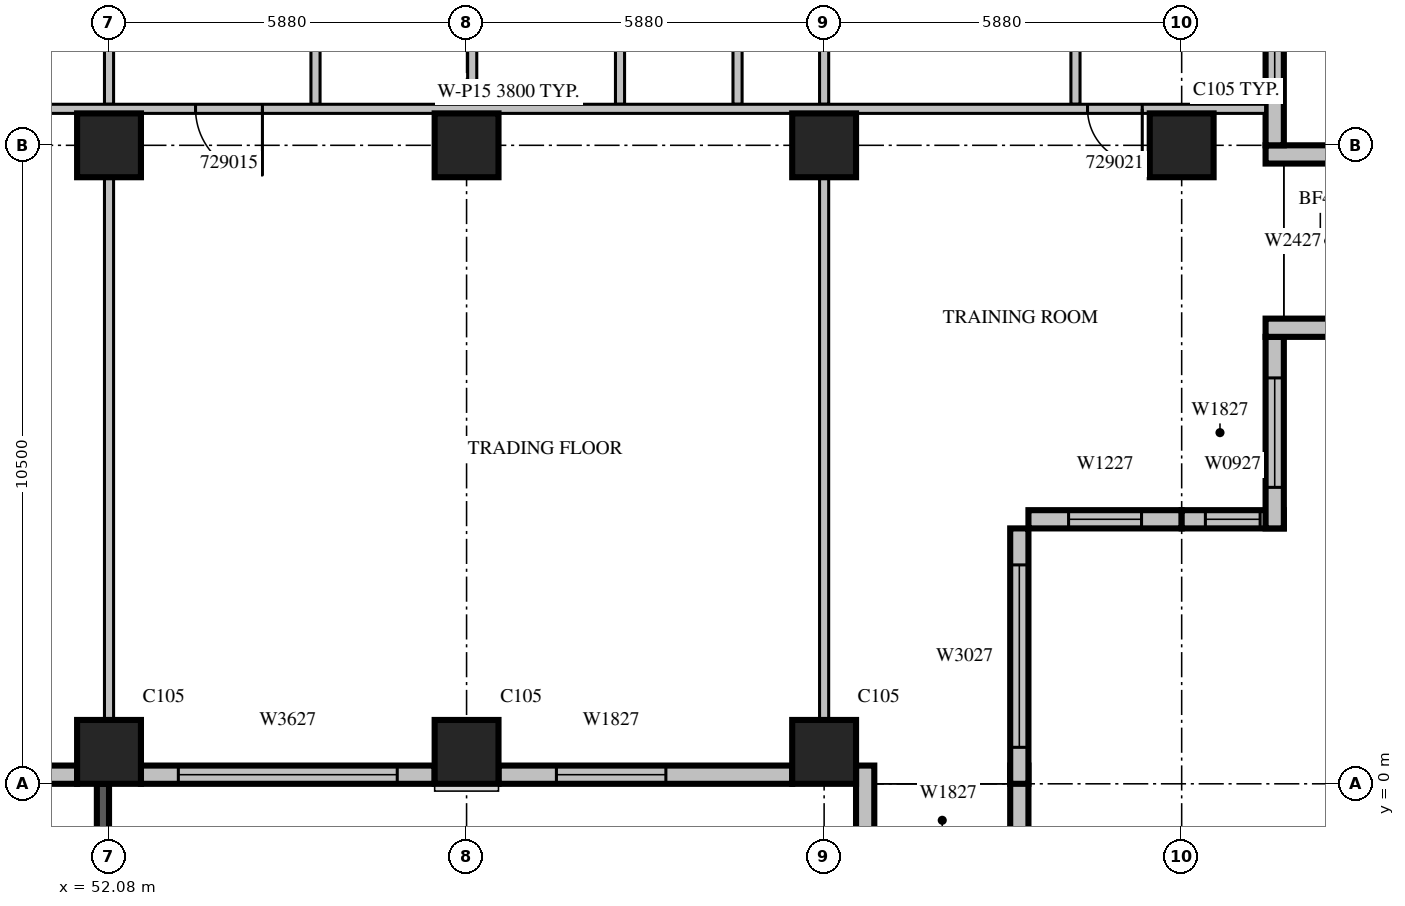
"""IFC4 building model, lengths in metres.
Left out: names, types, materials, properties, quantities, classifications, styles, units other than length and angle.
Written with IfcOpenShell. Run it as: python <this file> out.ifc"""

import sys

from ifc_helpers import new_model, si_unit, direction, frame, frame_2d, origin, origin_2d, place, context, subcontext, project, spatial, rectangle, extrude, source, transform, mapped, element, fill, save


model = new_model("IFC4")
c1 = context("Model", 3, precision=1e-05, world=origin(), true_north=direction((0.0, 1.0)))
c2 = subcontext(c1, "Body", "Model", "MODEL_VIEW")
j1 = project(units=[si_unit("LENGTHUNIT", "METRE"), si_unit("PLANEANGLEUNIT", "RADIAN")], contexts=[c1])
p1 = place(None, origin())
s1 = spatial("IfcSite", under=j1, at=p1, CompositionType="ELEMENT")
p2 = place(p1, origin())
s2 = spatial("IfcBuilding", under=s1, at=p2, CompositionType="ELEMENT")
p3 = place(p2, frame((0.0, 0.0, 132.9)))
s3 = spatial("IfcBuildingStorey", under=s2, at=p3, CompositionType="ELEMENT", Elevation=132.9)
m1 = source(origin(), c2, "Body", "SweptSolid", [
    extrude(rectangle(XDim=1.05, YDim=1.05, at=origin_2d()), origin(), (0.0, 0.0, 1.0), 4.2),
])
for number, where, z_axis, x_axis in (
    (1, (52.08, 0.525, 0.0), (0.0, 0.0, 1.0), (1.0, 0.0, 0.0)),
    (2, (57.96, 0.525, 0.0), (0.0, 0.0, 1.0), (1.0, 0.0, 0.0)),
    (3, (63.84, 0.525, 0.0), (0.0, 0.0, 1.0), (1.0, 0.0, 0.0)),
    (4, (52.08, 10.5, 0.0), (0.0, 0.0, 1.0), (1.0, 0.0, 0.0)),
    (5, (57.96, 10.5, 0.0), (0.0, 0.0, 1.0), (1.0, 0.0, 0.0)),
    (6, (63.84, 10.5, 0.0), (0.0, 0.0, 1.0), (1.0, 0.0, 0.0)),
    (7, (69.72, 10.5, 0.0), (0.0, 0.0, 1.0), (1.0, 0.0, 0.0)),
):
    element("IfcColumn", number, at=place(p3, frame(where, z_axis=z_axis, x_axis=x_axis)), inside=s3, PredefinedType="COLUMN", context=c2, shape_type="MappedRepresentation", body=[
        mapped(m1, transform((0.0, 0.0, 0.0), scale=1.0)),
    ])
m2 = source(origin(), c2, "Body", "SweptSolid", [
    extrude(rectangle(XDim=4.83, YDim=0.3, at=frame_2d((2.415, 0.0))), origin(), (0.0, 0.0, 1.0), 3.8),
])
p4 = place(p3, frame((46.725, 0.15, 0.0), z_axis=(0.0, 0.0, 1.0), x_axis=(1.0, 0.0, 0.0)))
e8 = element("IfcWall", 8, at=p4, inside=s3, PredefinedType="STANDARD", context=c2, shape_type="MappedRepresentation", body=[
    mapped(m2, transform((0.0, 0.0, 0.0), scale=1.0)),
])
m3 = source(origin(), c2, "Body", "SweptSolid", [
    extrude(rectangle(XDim=1.0, YDim=2.1, at=frame_2d((0.5, 1.05))), frame((0.0, 0.16, 0.0), z_axis=(0.0, -1.0, 0.0), x_axis=(1.0, 0.0, 0.0)), (0.0, 0.0, 1.0), 0.32),
])
p5 = place(p4, frame((1.915, 0.0, 0.0)))
e9 = element("IfcOpeningElement", 9, at=p5, cuts=e8, PredefinedType="OPENING", context=c2, shape_type="MappedRepresentation", body=[
    mapped(m3, transform((0.0, 0.0, 0.0), scale=1.0)),
])
p6 = place(p3, frame((52.605, 0.15, 0.0), z_axis=(0.0, 0.0, 1.0), x_axis=(1.0, 0.0, 0.0)))
e10 = element("IfcWall", 10, at=p6, inside=s3, PredefinedType="STANDARD", context=c2, shape_type="MappedRepresentation", body=[
    mapped(m2, transform((0.0, 0.0, 0.0), scale=1.0)),
])
m4 = source(origin(), c2, "Body", "SweptSolid", [
    extrude(rectangle(XDim=3.6, YDim=2.7, at=frame_2d((1.8, 1.35))), frame((0.0, 0.16, 0.0), z_axis=(0.0, -1.0, 0.0), x_axis=(1.0, 0.0, 0.0)), (0.0, 0.0, 1.0), 0.32),
])
p7 = place(p6, frame((0.615, 0.0, 0.6)))
e11 = element("IfcOpeningElement", 11, at=p7, cuts=e10, PredefinedType="OPENING", context=c2, shape_type="MappedRepresentation", body=[
    mapped(m4, transform((0.0, 0.0, 0.0), scale=1.0)),
])
p8 = place(p3, frame((58.485, 0.15, 0.0), z_axis=(0.0, 0.0, 1.0), x_axis=(1.0, 0.0, 0.0)))
e12 = element("IfcWall", 12, at=p8, inside=s3, PredefinedType="STANDARD", context=c2, shape_type="MappedRepresentation", body=[
    mapped(m2, transform((0.0, 0.0, 0.0), scale=1.0)),
])
m5 = source(origin(), c2, "Body", "SweptSolid", [
    extrude(rectangle(XDim=1.8, YDim=2.7, at=frame_2d((0.9, 1.35))), frame((0.0, 0.16, 0.0), z_axis=(0.0, -1.0, 0.0), x_axis=(1.0, 0.0, 0.0)), (0.0, 0.0, 1.0), 0.32),
])
p9 = place(p8, frame((0.953, 0.0, 0.6)))
e13 = element("IfcOpeningElement", 13, at=p9, cuts=e12, PredefinedType="OPENING", context=c2, shape_type="MappedRepresentation", body=[
    mapped(m5, transform((0.0, 0.0, 0.0), scale=1.0)),
])
m6 = source(origin(), c2, "Body", "SweptSolid", [
    extrude(rectangle(XDim=1.2, YDim=0.3, at=frame_2d((0.6, 0.0))), origin(), (0.0, 0.0, 1.0), 3.8),
])
for number, where, z_axis, x_axis in (
    (14, (64.515, 0.3, 0.0), (0.0, 0.0, 1.0), (0.0, -1.0, 0.0)),
    (15, (67.05, 0.3, 0.0), (0.0, 0.0, 1.0), (0.0, -1.0, 0.0)),
):
    element("IfcWall", number, at=place(p3, frame(where, z_axis=z_axis, x_axis=x_axis)), inside=s3, PredefinedType="STANDARD", context=c2, shape_type="MappedRepresentation", body=[
        mapped(m6, transform((0.0, 0.0, 0.0), scale=1.0)),
    ])
m7 = source(origin(), c2, "Body", "SweptSolid", [
    extrude(rectangle(XDim=4.2, YDim=0.3, at=frame_2d((2.1, 0.0))), origin(), (0.0, 0.0, 1.0), 3.8),
])
p10 = place(p3, frame((67.05, 0.0, 0.0), z_axis=(0.0, 0.0, 1.0), x_axis=(0.0, 1.0, 0.0)))
e16 = element("IfcWall", 16, at=p10, inside=s3, PredefinedType="STANDARD", context=c2, shape_type="MappedRepresentation", body=[
    mapped(m7, transform((0.0, 0.0, 0.0), scale=1.0)),
])
m8 = source(origin(), c2, "Body", "SweptSolid", [
    extrude(rectangle(XDim=3.0, YDim=2.7, at=frame_2d((1.5, 1.35))), frame((0.0, 0.16, 0.0), z_axis=(0.0, -1.0, 0.0), x_axis=(1.0, 0.0, 0.0)), (0.0, 0.0, 1.0), 0.32),
])
p11 = place(p10, frame((0.6, 0.0, 0.6)))
e17 = element("IfcOpeningElement", 17, at=p11, cuts=e16, PredefinedType="OPENING", context=c2, shape_type="MappedRepresentation", body=[
    mapped(m8, transform((0.0, 0.0, 0.0), scale=1.0)),
])
m9 = source(origin(), c2, "Body", "SweptSolid", [
    extrude(rectangle(XDim=2.52, YDim=0.3, at=frame_2d((1.26, 0.0))), origin(), (0.0, 0.0, 1.0), 3.8),
])
p12 = place(p3, frame((67.2, 4.35, 0.0), z_axis=(0.0, 0.0, 1.0), x_axis=(1.0, 0.0, 0.0)))
e18 = element("IfcWall", 18, at=p12, inside=s3, PredefinedType="STANDARD", context=c2, shape_type="MappedRepresentation", body=[
    mapped(m9, transform((0.0, 0.0, 0.0), scale=1.0)),
])
m10 = source(origin(), c2, "Body", "SweptSolid", [
    extrude(rectangle(XDim=1.2, YDim=2.7, at=frame_2d((0.6, 1.35))), frame((0.0, 0.16, 0.0), z_axis=(0.0, -1.0, 0.0), x_axis=(1.0, 0.0, 0.0)), (0.0, 0.0, 1.0), 0.32),
])
p13 = place(p12, frame((0.66, 0.0, 0.6)))
e19 = element("IfcOpeningElement", 19, at=p13, cuts=e18, PredefinedType="OPENING", context=c2, shape_type="MappedRepresentation", body=[
    mapped(m10, transform((0.0, 0.0, 0.0), scale=1.0)),
])
m11 = source(origin(), c2, "Body", "SweptSolid", [
    extrude(rectangle(XDim=1.68, YDim=0.3, at=frame_2d((0.84, 0.0))), origin(), (0.0, 0.0, 1.0), 3.8),
])
p14 = place(p3, frame((69.72, 4.35, 0.0), z_axis=(0.0, 0.0, 1.0), x_axis=(1.0, 0.0, 0.0)))
e20 = element("IfcWall", 20, at=p14, inside=s3, PredefinedType="STANDARD", context=c2, shape_type="MappedRepresentation", body=[
    mapped(m11, transform((0.0, 0.0, 0.0), scale=1.0)),
])
m12 = source(origin(), c2, "Body", "SweptSolid", [
    extrude(rectangle(XDim=0.9, YDim=2.7, at=frame_2d((0.45, 1.35))), frame((0.0, 0.16, 0.0), z_axis=(0.0, -1.0, 0.0), x_axis=(1.0, 0.0, 0.0)), (0.0, 0.0, 1.0), 0.32),
])
p15 = place(p14, frame((0.39, 0.0, 0.6)))
e21 = element("IfcOpeningElement", 21, at=p15, cuts=e20, PredefinedType="OPENING", context=c2, shape_type="MappedRepresentation", body=[
    mapped(m12, transform((0.0, 0.0, 0.0), scale=1.0)),
])
m13 = source(origin(), c2, "Body", "SweptSolid", [
    extrude(rectangle(XDim=3.15, YDim=0.3, at=frame_2d((1.575, 0.0))), origin(), (0.0, 0.0, 1.0), 3.8),
])
p16 = place(p3, frame((71.25, 4.2, 0.0), z_axis=(0.0, 0.0, 1.0), x_axis=(0.0, 1.0, 0.0)))
e22 = element("IfcWall", 22, at=p16, inside=s3, PredefinedType="STANDARD", context=c2, shape_type="MappedRepresentation", body=[
    mapped(m13, transform((0.0, 0.0, 0.0), scale=1.0)),
])
p17 = place(p16, frame((0.675, 0.0, 0.6)))
e23 = element("IfcOpeningElement", 23, at=p17, cuts=e22, PredefinedType="OPENING", context=c2, shape_type="MappedRepresentation", body=[
    mapped(m5, transform((0.0, 0.0, 0.0), scale=1.0)),
])
for number, where, z_axis, x_axis in (
    (24, (71.1, 7.5, 0.0), (0.0, 0.0, 1.0), (1.0, 0.0, 0.0)),
    (25, (71.1, 10.35, 0.0), (0.0, 0.0, 1.0), (1.0, 0.0, 0.0)),
):
    element("IfcWall", number, at=place(p3, frame(where, z_axis=z_axis, x_axis=x_axis)), inside=s3, PredefinedType="STANDARD", context=c2, shape_type="MappedRepresentation", body=[
        mapped(m6, transform((0.0, 0.0, 0.0), scale=1.0)),
    ])
m14 = source(origin(), c2, "Body", "SweptSolid", [
    extrude(rectangle(XDim=6.3, YDim=0.3, at=frame_2d((3.15, 0.0))), origin(), (0.0, 0.0, 1.0), 3.8),
])
p18 = place(p3, frame((71.25, 10.5, 0.0), z_axis=(0.0, 0.0, 1.0), x_axis=(0.0, 1.0, 0.0)))
e26 = element("IfcWall", 26, at=p18, inside=s3, PredefinedType="STANDARD", context=c2, shape_type="MappedRepresentation", body=[
    mapped(m14, transform((0.0, 0.0, 0.0), scale=1.0)),
])
p19 = place(p18, frame((1.025, 0.0, 0.6)))
e27 = element("IfcOpeningElement", 27, at=p19, cuts=e26, PredefinedType="OPENING", context=c2, shape_type="MappedRepresentation", body=[
    mapped(m10, transform((0.0, 0.0, 0.0), scale=1.0)),
])
m15 = source(origin(), c2, "Body", "SweptSolid", [
    extrude(rectangle(XDim=3.9, YDim=0.2, at=frame_2d((1.95, 0.0))), origin(), (0.0, 0.0, 1.0), 3.79),
])
p20 = place(p3, frame((51.98, 0.0, 0.0), z_axis=(0.0, 0.0, 1.0), x_axis=(0.0, -1.0, 0.0)))
e28 = element("IfcWall", 28, at=p20, inside=s3, PredefinedType="SOLIDWALL", context=c2, shape_type="MappedRepresentation", body=[
    mapped(m15, transform((0.0, 0.0, 0.0), scale=1.0)),
])
m16 = source(origin(), c2, "Body", "SweptSolid", [
    extrude(rectangle(XDim=2.4, YDim=2.7, at=frame_2d((1.2, 1.35))), frame((0.0, 0.11, 0.0), z_axis=(0.0, -1.0, 0.0), x_axis=(1.0, 0.0, 0.0)), (0.0, 0.0, 1.0), 0.22),
])
p21 = place(p20, frame((0.75, 0.0, 0.6)))
e29 = element("IfcOpeningElement", 29, at=p21, cuts=e28, PredefinedType="OPENING", context=c2, shape_type="MappedRepresentation", body=[
    mapped(m16, transform((0.0, 0.0, 0.0), scale=1.0)),
])
m17 = source(origin(), c2, "Body", "SweptSolid", [
    extrude(rectangle(XDim=3.525, YDim=0.15, at=frame_2d((1.762, 0.0))), origin(), (0.0, 0.0, 1.0), 3.8),
])
for number, where, z_axis, x_axis in (
    (30, (55.476, 11.175, 0.0), (0.0, 0.0, 1.0), (0.0, 1.0, 0.0)),
    (31, (58.053, 11.175, 0.0), (0.0, 0.0, 1.0), (0.0, 1.0, 0.0)),
    (32, (60.483, 11.175, 0.0), (0.0, 0.0, 1.0), (0.0, 1.0, 0.0)),
    (33, (62.416, 11.175, 0.0), (0.0, 0.0, 1.0), (0.0, 1.0, 0.0)),
    (34, (67.974, 11.175, 0.0), (0.0, 0.0, 1.0), (0.0, 1.0, 0.0)),
):
    element("IfcWall", number, at=place(p3, frame(where, z_axis=z_axis, x_axis=x_axis)), inside=s3, PredefinedType="PARTITIONING", context=c2, shape_type="MappedRepresentation", body=[
        mapped(m17, transform((0.0, 0.0, 0.0), scale=1.0)),
    ])
m18 = source(origin(), c2, "Body", "SweptSolid", [
    extrude(rectangle(XDim=8.927, YDim=0.15, at=frame_2d((4.463, 0.0))), origin(), (0.0, 0.0, 1.0), 3.8),
])
p22 = place(p3, frame((52.08, 1.049, 0.0), z_axis=(0.0, 0.0, 1.0), x_axis=(0.0, 1.0, 0.0)))
e35 = element("IfcWall", 35, at=p22, inside=s3, PredefinedType="PARTITIONING", context=c2, shape_type="MappedRepresentation", body=[
    mapped(m18, transform((0.0, 0.0, 0.0), scale=1.0)),
])
p23 = place(p3, frame((52.08, 11.175, 0.0), z_axis=(0.0, 0.0, 1.0), x_axis=(0.0, 1.0, 0.0)))
e36 = element("IfcWall", 36, at=p23, inside=s3, PredefinedType="PARTITIONING", context=c2, shape_type="MappedRepresentation", body=[
    mapped(m17, transform((0.0, 0.0, 0.0), scale=1.0)),
])
p24 = place(p3, frame((63.84, 1.049, 0.0), z_axis=(0.0, 0.0, 1.0), x_axis=(0.0, 1.0, 0.0)))
e37 = element("IfcWall", 37, at=p24, inside=s3, PredefinedType="PARTITIONING", context=c2, shape_type="MappedRepresentation", body=[
    mapped(m18, transform((0.0, 0.0, 0.0), scale=1.0)),
])
p25 = place(p3, frame((63.84, 11.175, 0.0), z_axis=(0.0, 0.0, 1.0), x_axis=(0.0, 1.0, 0.0)))
e38 = element("IfcWall", 38, at=p25, inside=s3, PredefinedType="PARTITIONING", context=c2, shape_type="MappedRepresentation", body=[
    mapped(m17, transform((0.0, 0.0, 0.0), scale=1.0)),
])
m19 = source(origin(), c2, "Body", "SweptSolid", [
    extrude(rectangle(XDim=24.9, YDim=0.15, at=frame_2d((12.45, 0.0))), origin(), (0.0, 0.0, 1.0), 3.8),
])
p26 = place(p3, frame((71.1, 11.1, 0.0), z_axis=(0.0, 0.0, 1.0), x_axis=(-1.0, 0.0, 0.0)))
e39 = element("IfcWall", 39, at=p26, inside=s3, PredefinedType="PARTITIONING", context=c2, shape_type="MappedRepresentation", body=[
    mapped(m19, transform((0.0, 0.0, 0.0), scale=1.0)),
])
m20 = source(origin(), c2, "Body", "SweptSolid", [
    extrude(rectangle(XDim=1.1, YDim=2.1, at=frame_2d((0.55, 1.05))), frame((0.0, 0.085, 0.0), z_axis=(0.0, -1.0, 0.0), x_axis=(1.0, 0.0, 0.0)), (0.0, 0.0, 1.0), 0.17),
])
p27 = place(p26, frame((19.988, 0.0, 0.0)))
e40 = element("IfcOpeningElement", 40, at=p27, cuts=e39, PredefinedType="OPENING", context=c2, shape_type="MappedRepresentation", body=[
    mapped(m20, transform((0.0, 0.0, 0.0), scale=1.0)),
])
p28 = place(p26, frame((16.497, 0.0, 0.0)))
e41 = element("IfcOpeningElement", 41, at=p28, cuts=e39, PredefinedType="OPENING", context=c2, shape_type="MappedRepresentation", body=[
    mapped(m20, transform((0.0, 0.0, 0.0), scale=1.0)),
])
m21 = source(origin(), c2, "Body", "SweptSolid", [
    extrude(rectangle(XDim=0.9, YDim=2.1, at=frame_2d((0.45, 1.05))), frame((0.0, 0.085, 0.0), z_axis=(0.0, -1.0, 0.0), x_axis=(1.0, 0.0, 0.0)), (0.0, 0.0, 1.0), 0.17),
])
p29 = place(p26, frame((2.028, 0.0, 0.0)))
e42 = element("IfcOpeningElement", 42, at=p29, cuts=e39, PredefinedType="OPENING", context=c2, shape_type="MappedRepresentation", body=[
    mapped(m21, transform((0.0, 0.0, 0.0), scale=1.0)),
])
m22 = source(origin(), c2, "Body", "SweptSolid", [
    extrude(rectangle(XDim=3.6, YDim=2.7, at=frame_2d((1.8, 1.35))), frame((0.0, 0.03, 0.0), z_axis=(0.0, -1.0, 0.0), x_axis=(1.0, 0.0, 0.0)), (0.0, 0.0, 1.0), 0.06),
])
p30 = place(p7, origin())
e43 = element("IfcWindow", 43, at=p30, inside=s3, PartitioningType="SINGLE_PANEL", PredefinedType="WINDOW", context=c2, shape_type="MappedRepresentation", body=[
    mapped(m22, transform((0.0, 0.0, 0.0), scale=1.0)),
])
fill(e11, e43)
m23 = source(origin(), c2, "Body", "SweptSolid", [
    extrude(rectangle(XDim=1.8, YDim=2.7, at=frame_2d((0.9, 1.35))), frame((0.0, 0.03, 0.0), z_axis=(0.0, -1.0, 0.0), x_axis=(1.0, 0.0, 0.0)), (0.0, 0.0, 1.0), 0.06),
])
p31 = place(p9, origin())
e44 = element("IfcWindow", 44, at=p31, inside=s3, PartitioningType="SINGLE_PANEL", PredefinedType="WINDOW", context=c2, shape_type="MappedRepresentation", body=[
    mapped(m23, transform((0.0, 0.0, 0.0), scale=1.0)),
])
fill(e13, e44)
m24 = source(origin(), c2, "Body", "SweptSolid", [
    extrude(rectangle(XDim=3.0, YDim=2.7, at=frame_2d((1.5, 1.35))), frame((0.0, 0.03, 0.0), z_axis=(0.0, -1.0, 0.0), x_axis=(1.0, 0.0, 0.0)), (0.0, 0.0, 1.0), 0.06),
])
p32 = place(p11, origin())
e45 = element("IfcWindow", 45, at=p32, inside=s3, PartitioningType="SINGLE_PANEL", PredefinedType="WINDOW", context=c2, shape_type="MappedRepresentation", body=[
    mapped(m24, transform((0.0, 0.0, 0.0), scale=1.0)),
])
fill(e17, e45)
m25 = source(origin(), c2, "Body", "SweptSolid", [
    extrude(rectangle(XDim=1.2, YDim=2.7, at=frame_2d((0.6, 1.35))), frame((0.0, 0.03, 0.0), z_axis=(0.0, -1.0, 0.0), x_axis=(1.0, 0.0, 0.0)), (0.0, 0.0, 1.0), 0.06),
])
p33 = place(p13, origin())
e46 = element("IfcWindow", 46, at=p33, inside=s3, PartitioningType="SINGLE_PANEL", PredefinedType="WINDOW", context=c2, shape_type="MappedRepresentation", body=[
    mapped(m25, transform((0.0, 0.0, 0.0), scale=1.0)),
])
fill(e19, e46)
m26 = source(origin(), c2, "Body", "SweptSolid", [
    extrude(rectangle(XDim=0.9, YDim=2.7, at=frame_2d((0.45, 1.35))), frame((0.0, 0.03, 0.0), z_axis=(0.0, -1.0, 0.0), x_axis=(1.0, 0.0, 0.0)), (0.0, 0.0, 1.0), 0.06),
])
p34 = place(p15, origin())
e47 = element("IfcWindow", 47, at=p34, inside=s3, PartitioningType="SINGLE_PANEL", PredefinedType="WINDOW", context=c2, shape_type="MappedRepresentation", body=[
    mapped(m26, transform((0.0, 0.0, 0.0), scale=1.0)),
])
fill(e21, e47)
p35 = place(p17, origin())
e48 = element("IfcWindow", 48, at=p35, inside=s3, PartitioningType="SINGLE_PANEL", PredefinedType="WINDOW", context=c2, shape_type="MappedRepresentation", body=[
    mapped(m23, transform((0.0, 0.0, 0.0), scale=1.0)),
])
fill(e23, e48)
p36 = place(p19, origin())
e49 = element("IfcWindow", 49, at=p36, inside=s3, PartitioningType="SINGLE_PANEL", PredefinedType="WINDOW", context=c2, shape_type="MappedRepresentation", body=[
    mapped(m25, transform((0.0, 0.0, 0.0), scale=1.0)),
])
fill(e27, e49)
m27 = source(origin(), c2, "Body", "SweptSolid", [
    extrude(rectangle(XDim=1.1, YDim=2.1, at=frame_2d((0.55, 1.05))), frame((0.0, 0.025, 0.0), z_axis=(0.0, -1.0, 0.0), x_axis=(1.0, 0.0, 0.0)), (0.0, 0.0, 1.0), 0.05),
])
p37 = place(p28, origin())
e50 = element("IfcDoor", 50, at=p37, inside=s3, OperationType="SINGLE_SWING_LEFT", PredefinedType="DOOR", context=c2, shape_type="MappedRepresentation", body=[
    mapped(m27, transform((0.0, 0.0, 0.0), scale=1.0)),
])
fill(e41, e50)
m28 = source(origin(), c2, "Body", "SweptSolid", [
    extrude(rectangle(XDim=0.9, YDim=2.1, at=frame_2d((0.45, 1.05))), frame((0.0, 0.025, 0.0), z_axis=(0.0, -1.0, 0.0), x_axis=(1.0, 0.0, 0.0)), (0.0, 0.0, 1.0), 0.05),
])
p38 = place(p29, origin())
e51 = element("IfcDoor", 51, at=p38, inside=s3, OperationType="SINGLE_SWING_LEFT", PredefinedType="DOOR", context=c2, shape_type="MappedRepresentation", body=[
    mapped(m28, transform((0.0, 0.0, 0.0), scale=1.0)),
])
fill(e42, e51)
save(model, sys.argv[1])
